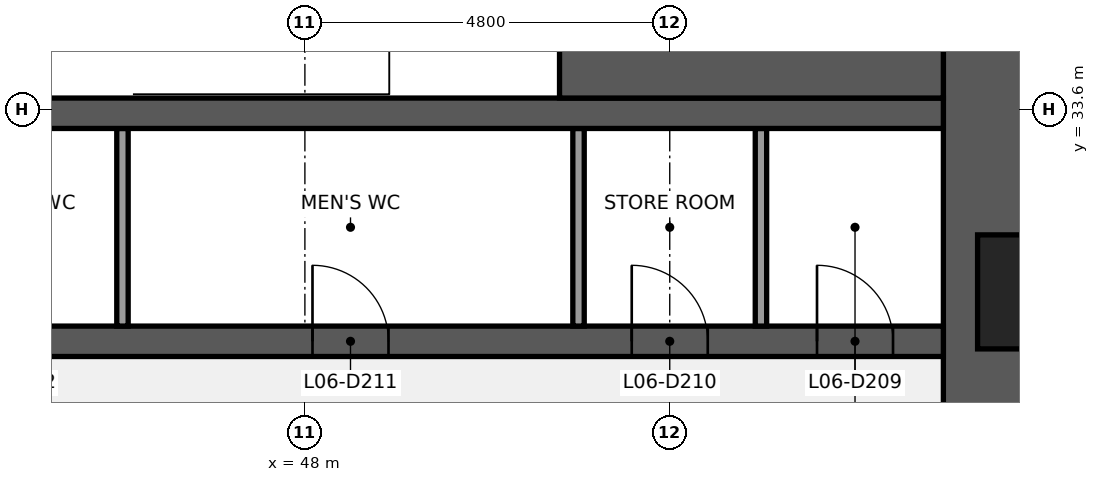
"""IFC4 building model, lengths in metres.
Left out: names, types, materials, properties, quantities, classifications, styles, units other than length and angle.
Written with IfcOpenShell. Run it as: python <this file> out.ifc"""

import sys

from ifc_helpers import new_model, si_unit, direction, frame, frame_2d, origin, place, context, subcontext, project, spatial, rectangle, extrude, element, fill, save


model = new_model("IFC4")
c1 = context("Model", 3, precision=1e-05, world=origin(), true_north=direction((0.0, 1.0)))
c2 = subcontext(c1, "Body", "Model", "MODEL_VIEW")
j1 = project(units=[si_unit("LENGTHUNIT", "METRE"), si_unit("PLANEANGLEUNIT", "RADIAN")], contexts=[c1])
p1 = place(None, origin())
s1 = spatial("IfcSite", under=j1, at=p1, CompositionType="ELEMENT")
p2 = place(p1, origin())
s2 = spatial("IfcBuilding", under=s1, at=p2, CompositionType="ELEMENT")
p3 = place(p2, frame((0.0, 0.0, 34.6)))
s3 = spatial("IfcBuildingStorey", under=s2, at=p3, CompositionType="ELEMENT", Elevation=34.6)
p4 = place(p3, frame((57.0, 38.4, 0.0), z_axis=(0.0, 0.0, 1.0), x_axis=(0.0, -1.0, 0.0)))
e1 = element("IfcWall", 1, at=p4, inside=s3, PredefinedType="SHEAR", context=c2, shape_type="SweptSolid", body=[
    extrude(rectangle(XDim=28.8, YDim=1.2, at=frame_2d((14.4, 0.0))), origin(), (0.0, 0.0, 1.0), 4.24),
])
p5 = place(p4, frame((18.45, 0.0, 0.9)))
e2 = element("IfcOpeningElement", 2, at=p5, cuts=e1, PredefinedType="OPENING", context=c2, shape_type="SweptSolid", body=[
    extrude(rectangle(XDim=1.5, YDim=1.5, at=frame_2d((0.75, 0.75))), frame((0.0, 0.61, 0.0), z_axis=(0.0, -1.0, 0.0), x_axis=(1.0, 0.0, 0.0)), (0.0, 0.0, 1.0), 1.22),
])
p6 = place(p4, frame((8.85, 0.0, 0.9)))
e3 = element("IfcOpeningElement", 3, at=p6, cuts=e1, PredefinedType="OPENING", context=c2, shape_type="SweptSolid", body=[
    extrude(rectangle(XDim=1.5, YDim=1.5, at=frame_2d((0.75, 0.75))), frame((0.0, 0.61, 0.0), z_axis=(0.0, -1.0, 0.0), x_axis=(1.0, 0.0, 0.0)), (0.0, 0.0, 1.0), 1.22),
])
p7 = place(p3, frame((39.6, 30.55, 0.0), z_axis=(0.0, 0.0, 1.0), x_axis=(1.0, 0.0, 0.0)))
e4 = element("IfcWall", 4, at=p7, inside=s3, PredefinedType="SHEAR", context=c2, shape_type="SweptSolid", body=[
    extrude(rectangle(XDim=16.8, YDim=0.4, at=frame_2d((8.4, 0.0))), origin(), (0.0, 0.0, 1.0), 4.24),
])
p8 = place(p7, frame((15.137, 0.0, 0.0)))
e5 = element("IfcOpeningElement", 5, at=p8, cuts=e4, PredefinedType="OPENING", context=c2, shape_type="SweptSolid", body=[
    extrude(rectangle(XDim=1.0, YDim=2.1, at=frame_2d((0.5, 1.05))), frame((0.0, 0.21, 0.0), z_axis=(0.0, -1.0, 0.0), x_axis=(1.0, 0.0, 0.0)), (0.0, 0.0, 1.0), 0.42),
])
p9 = place(p7, frame((12.7, 0.0, 0.0)))
e6 = element("IfcOpeningElement", 6, at=p9, cuts=e4, PredefinedType="OPENING", context=c2, shape_type="SweptSolid", body=[
    extrude(rectangle(XDim=1.0, YDim=2.1, at=frame_2d((0.5, 1.05))), frame((0.0, 0.21, 0.0), z_axis=(0.0, -1.0, 0.0), x_axis=(1.0, 0.0, 0.0)), (0.0, 0.0, 1.0), 0.42),
])
p10 = place(p7, frame((8.5, 0.0, 0.0)))
e7 = element("IfcOpeningElement", 7, at=p10, cuts=e4, PredefinedType="OPENING", context=c2, shape_type="SweptSolid", body=[
    extrude(rectangle(XDim=1.0, YDim=2.1, at=frame_2d((0.5, 1.05))), frame((0.0, 0.21, 0.0), z_axis=(0.0, -1.0, 0.0), x_axis=(1.0, 0.0, 0.0)), (0.0, 0.0, 1.0), 0.42),
])
p11 = place(p7, frame((4.0, 0.0, 0.0)))
e8 = element("IfcOpeningElement", 8, at=p11, cuts=e4, PredefinedType="OPENING", context=c2, shape_type="SweptSolid", body=[
    extrude(rectangle(XDim=1.0, YDim=2.1, at=frame_2d((0.5, 1.05))), frame((0.0, 0.21, 0.0), z_axis=(0.0, -1.0, 0.0), x_axis=(1.0, 0.0, 0.0)), (0.0, 0.0, 1.0), 0.42),
])
p12 = place(p7, frame((0.962, 0.0, 0.0)))
e9 = element("IfcOpeningElement", 9, at=p12, cuts=e4, PredefinedType="OPENING", context=c2, shape_type="SweptSolid", body=[
    extrude(rectangle(XDim=1.0, YDim=2.1, at=frame_2d((0.5, 1.05))), frame((0.0, 0.21, 0.0), z_axis=(0.0, -1.0, 0.0), x_axis=(1.0, 0.0, 0.0)), (0.0, 0.0, 1.0), 0.42),
])
for number, where, z_axis, x_axis in (
    (10, (54.0, 30.75, 0.0), (0.0, 0.0, 1.0), (0.0, 1.0, 0.0)),
    (11, (51.6, 30.75, 0.0), (0.0, 0.0, 1.0), (0.0, 1.0, 0.0)),
    (12, (45.6, 30.75, 0.0), (0.0, 0.0, 1.0), (0.0, 1.0, 0.0)),
):
    element("IfcWall", number, at=place(p3, frame(where, z_axis=z_axis, x_axis=x_axis)), inside=s3, PredefinedType="PARTITIONING", context=c2, shape_type="SweptSolid", body=[
        extrude(rectangle(XDim=2.6, YDim=0.15, at=frame_2d((1.3, 0.0))), origin(), (0.0, 0.0, 1.0), 4.24),
    ])
p13 = place(p3, frame((39.6, 33.55, 0.0), z_axis=(0.0, 0.0, 1.0), x_axis=(1.0, 0.0, 0.0)))
e13 = element("IfcWall", 13, at=p13, inside=s3, PredefinedType="SHEAR", context=c2, shape_type="SweptSolid", body=[
    extrude(rectangle(XDim=16.8, YDim=0.4, at=frame_2d((8.4, 0.0))), origin(), (0.0, 0.0, 1.0), 4.24),
])
p14 = place(p3, frame((51.35, 35.475, 0.0), z_axis=(0.0, 0.0, 1.0), x_axis=(1.0, 0.0, 0.0)))
e14 = element("IfcWall", 14, at=p14, inside=s3, PredefinedType="SHEAR", context=c2, shape_type="SweptSolid", body=[
    extrude(rectangle(XDim=5.05, YDim=3.45, at=frame_2d((2.525, 0.0))), origin(), (0.0, 0.0, 1.0), 4.24),
])
p15 = place(p8, origin())
e15 = element("IfcDoor", 15, at=p15, inside=s3, OperationType="SINGLE_SWING_LEFT", PredefinedType="DOOR", context=c2, shape_type="SweptSolid", body=[
    extrude(rectangle(XDim=1.0, YDim=2.1, at=frame_2d((0.5, 1.05))), frame((0.0, 0.025, 0.0), z_axis=(0.0, -1.0, 0.0), x_axis=(1.0, 0.0, 0.0)), (0.0, 0.0, 1.0), 0.05),
])
fill(e5, e15)
p16 = place(p9, origin())
e16 = element("IfcDoor", 16, at=p16, inside=s3, OperationType="SINGLE_SWING_LEFT", PredefinedType="DOOR", context=c2, shape_type="SweptSolid", body=[
    extrude(rectangle(XDim=1.0, YDim=2.1, at=frame_2d((0.5, 1.05))), frame((0.0, 0.025, 0.0), z_axis=(0.0, -1.0, 0.0), x_axis=(1.0, 0.0, 0.0)), (0.0, 0.0, 1.0), 0.05),
])
fill(e6, e16)
p17 = place(p10, origin())
e17 = element("IfcDoor", 17, at=p17, inside=s3, OperationType="SINGLE_SWING_LEFT", PredefinedType="DOOR", context=c2, shape_type="SweptSolid", body=[
    extrude(rectangle(XDim=1.0, YDim=2.1, at=frame_2d((0.5, 1.05))), frame((0.0, 0.025, 0.0), z_axis=(0.0, -1.0, 0.0), x_axis=(1.0, 0.0, 0.0)), (0.0, 0.0, 1.0), 0.05),
])
fill(e7, e17)
save(model, sys.argv[1])
